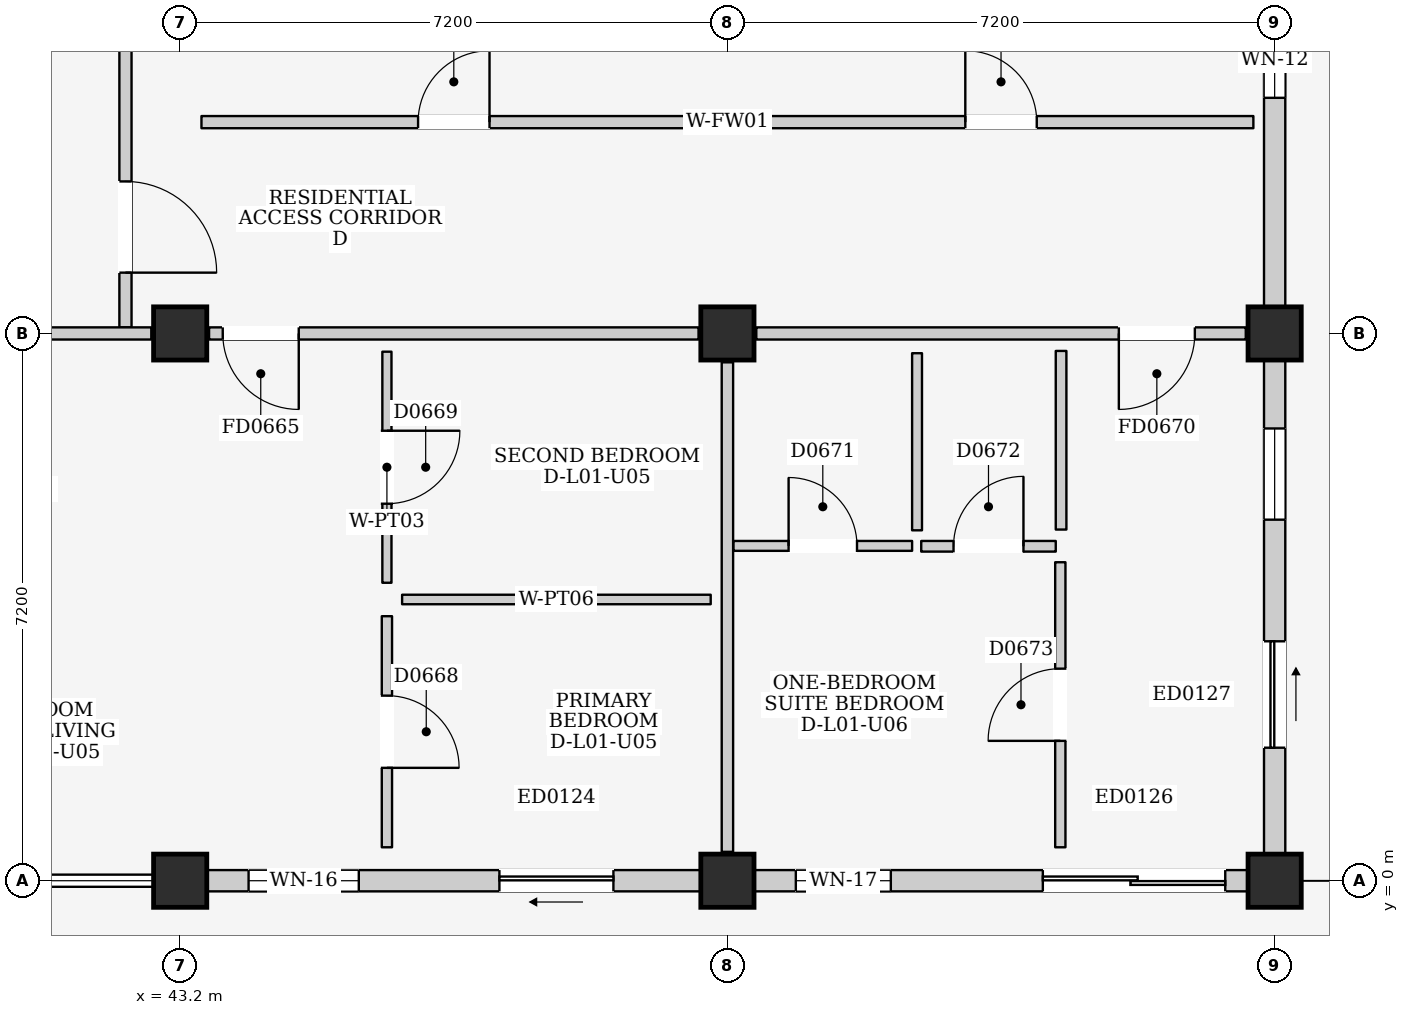
"""IFC4 building model, lengths in metres.
Left out: names, types, materials, properties, quantities, classifications, styles, units other than length and angle.
Written with IfcOpenShell. Run it as: python <this file> out.ifc"""

import sys

from ifc_helpers import new_model, si_unit, direction, frame, frame_2d, origin, origin_2d, place, context, subcontext, project, spatial, rectangle, extrude, element, fill, save


model = new_model("IFC4")
c1 = context("Model", 3, precision=1e-05, world=origin(), true_north=direction((0.0, 1.0)))
c2 = subcontext(c1, "Body", "Model", "MODEL_VIEW")
j1 = project(units=[si_unit("LENGTHUNIT", "METRE"), si_unit("PLANEANGLEUNIT", "RADIAN")], contexts=[c1])
p1 = place(None, origin())
s1 = spatial("IfcSite", under=j1, at=p1, CompositionType="ELEMENT")
p2 = place(p1, origin())
s2 = spatial("IfcBuilding", under=s1, at=p2, CompositionType="ELEMENT")
p3 = place(p2, frame((0.0, 0.0, 4.5)))
s3 = spatial("IfcBuildingStorey", under=s2, at=p3, CompositionType="ELEMENT", Elevation=4.5)
for number, where, z_axis, x_axis in (
    (1, (43.2, 0.0, 0.0), (0.0, 0.0, 1.0), (1.0, 0.0, 0.0)),
    (2, (43.2, 7.2, 0.0), (0.0, 0.0, 1.0), (1.0, 0.0, 0.0)),
    (3, (50.4, 0.0, 0.0), (0.0, 0.0, 1.0), (1.0, 0.0, 0.0)),
    (4, (50.4, 7.2, 0.0), (0.0, 0.0, 1.0), (1.0, 0.0, 0.0)),
    (5, (57.6, 0.0, 0.0), (0.0, 0.0, 1.0), (1.0, 0.0, 0.0)),
    (6, (57.6, 7.2, 0.0), (0.0, 0.0, 1.0), (1.0, 0.0, 0.0)),
):
    element("IfcColumn", number, at=place(p3, frame(where, z_axis=z_axis, x_axis=x_axis)), inside=s3, PredefinedType="COLUMN", context=c2, shape_type="SweptSolid", body=[
        extrude(rectangle(XDim=0.7, YDim=0.7, at=origin_2d()), origin(), (0.0, 0.0, 1.0), 4.5),
    ])
p4 = place(p3, frame((43.55, 0.0, 0.0), z_axis=(0.0, 0.0, 1.0), x_axis=(1.0, 0.0, 0.0)))
e7 = element("IfcWall", 7, at=p4, inside=s3, PredefinedType="ELEMENTEDWALL", context=c2, shape_type="SweptSolid", body=[
    extrude(rectangle(XDim=6.5, YDim=0.28, at=frame_2d((3.25, 0.0))), origin(), (0.0, 0.0, 1.0), 3.715),
])
p5 = place(p4, frame((3.85, 0.0, 0.0)))
e8 = element("IfcOpeningElement", 8, at=p5, cuts=e7, PredefinedType="OPENING", context=c2, shape_type="SweptSolid", body=[
    extrude(rectangle(XDim=1.5, YDim=2.12, at=frame_2d((0.75, 1.06))), frame((0.0, 0.155, 0.0), z_axis=(0.0, -1.0, 0.0), x_axis=(1.0, 0.0, 0.0)), (0.0, 0.0, 1.0), 0.31),
])
p6 = place(p4, frame((0.55, 0.0, 0.9)))
e9 = element("IfcOpeningElement", 9, at=p6, cuts=e7, PredefinedType="OPENING", context=c2, shape_type="SweptSolid", body=[
    extrude(rectangle(XDim=1.45, YDim=1.4, at=frame_2d((0.725, 0.7))), frame((0.0, 0.155, 0.0), z_axis=(0.0, -1.0, 0.0), x_axis=(1.0, 0.0, 0.0)), (0.0, 0.0, 1.0), 0.31),
])
p7 = place(p3, frame((50.75, 0.0, 0.0), z_axis=(0.0, 0.0, 1.0), x_axis=(1.0, 0.0, 0.0)))
e10 = element("IfcWall", 10, at=p7, inside=s3, PredefinedType="ELEMENTEDWALL", context=c2, shape_type="SweptSolid", body=[
    extrude(rectangle(XDim=6.5, YDim=0.28, at=frame_2d((3.25, 0.0))), origin(), (0.0, 0.0, 1.0), 3.715),
])
p8 = place(p7, frame((3.8, 0.0, 0.0)))
e11 = element("IfcOpeningElement", 11, at=p8, cuts=e10, PredefinedType="OPENING", context=c2, shape_type="SweptSolid", body=[
    extrude(rectangle(XDim=2.4, YDim=2.12, at=frame_2d((1.2, 1.06))), frame((0.0, 0.155, 0.0), z_axis=(0.0, -1.0, 0.0), x_axis=(1.0, 0.0, 0.0)), (0.0, 0.0, 1.0), 0.31),
])
p9 = place(p7, frame((0.55, 0.0, 0.9)))
e12 = element("IfcOpeningElement", 12, at=p9, cuts=e10, PredefinedType="OPENING", context=c2, shape_type="SweptSolid", body=[
    extrude(rectangle(XDim=1.25, YDim=1.3, at=frame_2d((0.625, 0.65))), frame((0.0, 0.155, 0.0), z_axis=(0.0, -1.0, 0.0), x_axis=(1.0, 0.0, 0.0)), (0.0, 0.0, 1.0), 0.31),
])
p10 = place(p3, frame((57.6, 0.35, 0.0), z_axis=(0.0, 0.0, 1.0), x_axis=(0.0, 1.0, 0.0)))
e13 = element("IfcWall", 13, at=p10, inside=s3, PredefinedType="ELEMENTEDWALL", context=c2, shape_type="SweptSolid", body=[
    extrude(rectangle(XDim=6.5, YDim=0.28, at=frame_2d((3.25, 0.0))), origin(), (0.0, 0.0, 1.0), 3.685),
])
p11 = place(p10, frame((1.4, 0.0, 0.0)))
e14 = element("IfcOpeningElement", 14, at=p11, cuts=e13, PredefinedType="OPENING", context=c2, shape_type="SweptSolid", body=[
    extrude(rectangle(XDim=1.4, YDim=2.1, at=frame_2d((0.7, 1.05))), frame((0.0, 0.155, 0.0), z_axis=(0.0, -1.0, 0.0), x_axis=(1.0, 0.0, 0.0)), (0.0, 0.0, 1.0), 0.31),
])
p12 = place(p10, frame((4.4, 0.0, 0.95)))
e15 = element("IfcOpeningElement", 15, at=p12, cuts=e13, PredefinedType="OPENING", context=c2, shape_type="SweptSolid", body=[
    extrude(rectangle(XDim=1.2, YDim=1.35, at=frame_2d((0.6, 0.675))), frame((0.0, 0.155, 0.0), z_axis=(0.0, -1.0, 0.0), x_axis=(1.0, 0.0, 0.0)), (0.0, 0.0, 1.0), 0.31),
])
p13 = place(p3, frame((57.6, 7.55, 0.0), z_axis=(0.0, 0.0, 1.0), x_axis=(0.0, 1.0, 0.0)))
e16 = element("IfcWall", 16, at=p13, inside=s3, PredefinedType="ELEMENTEDWALL", context=c2, shape_type="SweptSolid", body=[
    extrude(rectangle(XDim=6.5, YDim=0.28, at=frame_2d((3.25, 0.0))), origin(), (0.0, 0.0, 1.0), 3.685),
])
p14 = place(p13, frame((2.75, 0.0, 1.1)))
e17 = element("IfcOpeningElement", 17, at=p14, cuts=e16, PredefinedType="OPENING", context=c2, shape_type="SweptSolid", body=[
    extrude(rectangle(XDim=1.0, YDim=0.9, at=frame_2d((0.5, 0.45))), frame((0.0, 0.155, 0.0), z_axis=(0.0, -1.0, 0.0), x_axis=(1.0, 0.0, 0.0)), (0.0, 0.0, 1.0), 0.31),
])
p15 = place(p3, frame((42.48, 7.28, 0.0), z_axis=(0.0, 0.0, 1.0), x_axis=(0.0, 1.0, 0.0)))
e18 = element("IfcWall", 18, at=p15, inside=s3, PredefinedType="PARTITIONING", context=c2, shape_type="SweptSolid", body=[
    extrude(rectangle(XDim=4.32, YDim=0.16, at=frame_2d((2.16, 0.0))), origin(), (0.0, 0.0, 1.0), 4.25),
])
p16 = place(p15, frame((0.72, 0.0, 0.0)))
e19 = element("IfcOpeningElement", 19, at=p16, cuts=e18, PredefinedType="OPENING", context=c2, shape_type="SweptSolid", body=[
    extrude(rectangle(XDim=1.2, YDim=2.2, at=frame_2d((0.6, 1.1))), frame((0.0, 0.095, 0.0), z_axis=(0.0, -1.0, 0.0), x_axis=(1.0, 0.0, 0.0)), (0.0, 0.0, 1.0), 0.19),
])
p17 = place(p3, frame((36.38, 7.2, 0.0), z_axis=(0.0, 0.0, 1.0), x_axis=(1.0, 0.0, 0.0)))
e20 = element("IfcWall", 20, at=p17, inside=s3, PredefinedType="PARTITIONING", context=c2, shape_type="SweptSolid", body=[
    extrude(rectangle(XDim=6.44, YDim=0.16, at=frame_2d((3.22, 0.0))), origin(), (0.0, 0.0, 1.0), 3.635),
])
p18 = place(p3, frame((43.58, 7.2, 0.0), z_axis=(0.0, 0.0, 1.0), x_axis=(1.0, 0.0, 0.0)))
e21 = element("IfcWall", 21, at=p18, inside=s3, PredefinedType="PARTITIONING", context=c2, shape_type="SweptSolid", body=[
    extrude(rectangle(XDim=6.44, YDim=0.16, at=frame_2d((3.22, 0.0))), origin(), (0.0, 0.0, 1.0), 3.635),
])
p19 = place(p18, frame((0.18, 0.0, 0.0)))
e22 = element("IfcOpeningElement", 22, at=p19, cuts=e21, PredefinedType="OPENING", context=c2, shape_type="SweptSolid", body=[
    extrude(rectangle(XDim=1.0, YDim=2.15, at=frame_2d((0.5, 1.075))), frame((0.0, 0.095, 0.0), z_axis=(0.0, -1.0, 0.0), x_axis=(1.0, 0.0, 0.0)), (0.0, 0.0, 1.0), 0.19),
])
p20 = place(p3, frame((50.4, 0.38, 0.0), z_axis=(0.0, 0.0, 1.0), x_axis=(0.0, 1.0, 0.0)))
e23 = element("IfcWall", 23, at=p20, inside=s3, PredefinedType="PARTITIONING", context=c2, shape_type="SweptSolid", body=[
    extrude(rectangle(XDim=6.44, YDim=0.15, at=frame_2d((3.22, 0.0))), origin(), (0.0, 0.0, 1.0), 3.685),
])
p21 = place(p3, frame((45.92, 0.44, 0.0), z_axis=(0.0, 0.0, 1.0), x_axis=(0.0, 1.0, 0.0)))
e24 = element("IfcWall", 24, at=p21, inside=s3, PredefinedType="PARTITIONING", context=c2, shape_type="SweptSolid", body=[
    extrude(rectangle(XDim=3.04, YDim=0.135, at=frame_2d((1.52, 0.0))), origin(), (0.0, 0.0, 1.0), 4.25),
])
p22 = place(p21, frame((1.045, 0.0, 0.0)))
e25 = element("IfcOpeningElement", 25, at=p22, cuts=e24, PredefinedType="OPENING", context=c2, shape_type="SweptSolid", body=[
    extrude(rectangle(XDim=0.95, YDim=2.15, at=frame_2d((0.475, 1.075))), frame((0.0, 0.083, 0.0), z_axis=(0.0, -1.0, 0.0), x_axis=(1.0, 0.0, 0.0)), (0.0, 0.0, 1.0), 0.165),
])
p23 = place(p3, frame((46.12, 3.7, 0.0), z_axis=(0.0, 0.0, 1.0), x_axis=(1.0, 0.0, 0.0)))
e26 = element("IfcWall", 26, at=p23, inside=s3, PredefinedType="PARTITIONING", context=c2, shape_type="SweptSolid", body=[
    extrude(rectangle(XDim=4.06, YDim=0.125, at=frame_2d((2.03, 0.0))), origin(), (0.0, 0.0, 1.0), 4.25),
])
p24 = place(p3, frame((45.92, 3.92, 0.0), z_axis=(0.0, 0.0, 1.0), x_axis=(0.0, 1.0, 0.0)))
e27 = element("IfcWall", 27, at=p24, inside=s3, PredefinedType="PARTITIONING", context=c2, shape_type="SweptSolid", body=[
    extrude(rectangle(XDim=3.04, YDim=0.12, at=frame_2d((1.52, 0.0))), origin(), (0.0, 0.0, 1.0), 4.25),
])
p25 = place(p24, frame((1.04, 0.0, 0.0)))
e28 = element("IfcOpeningElement", 28, at=p25, cuts=e27, PredefinedType="OPENING", context=c2, shape_type="SweptSolid", body=[
    extrude(rectangle(XDim=0.96, YDim=2.15, at=frame_2d((0.48, 1.075))), frame((0.0, 0.075, 0.0), z_axis=(0.0, -1.0, 0.0), x_axis=(1.0, 0.0, 0.0)), (0.0, 0.0, 1.0), 0.15),
])
p26 = place(p3, frame((50.78, 7.2, 0.0), z_axis=(0.0, 0.0, 1.0), x_axis=(1.0, 0.0, 0.0)))
e29 = element("IfcWall", 29, at=p26, inside=s3, PredefinedType="PARTITIONING", context=c2, shape_type="SweptSolid", body=[
    extrude(rectangle(XDim=6.44, YDim=0.16, at=frame_2d((3.22, 0.0))), origin(), (0.0, 0.0, 1.0), 3.635),
])
p27 = place(p26, frame((4.77, 0.0, 0.0)))
e30 = element("IfcOpeningElement", 30, at=p27, cuts=e29, PredefinedType="OPENING", context=c2, shape_type="SweptSolid", body=[
    extrude(rectangle(XDim=1.0, YDim=2.15, at=frame_2d((0.5, 1.075))), frame((0.0, 0.095, 0.0), z_axis=(0.0, -1.0, 0.0), x_axis=(1.0, 0.0, 0.0)), (0.0, 0.0, 1.0), 0.19),
])
p28 = place(p3, frame((50.48, 4.405, 0.0), z_axis=(0.0, 0.0, 1.0), x_axis=(1.0, 0.0, 0.0)))
e31 = element("IfcWall", 31, at=p28, inside=s3, PredefinedType="PARTITIONING", context=c2, shape_type="SweptSolid", body=[
    extrude(rectangle(XDim=2.35, YDim=0.13, at=frame_2d((1.175, 0.0))), origin(), (0.0, 0.0, 1.0), 4.25),
])
p29 = place(p28, frame((0.725, 0.0, 0.0)))
e32 = element("IfcOpeningElement", 32, at=p29, cuts=e31, PredefinedType="OPENING", context=c2, shape_type="SweptSolid", body=[
    extrude(rectangle(XDim=0.9, YDim=2.1, at=frame_2d((0.45, 1.05))), frame((0.0, 0.08, 0.0), z_axis=(0.0, -1.0, 0.0), x_axis=(1.0, 0.0, 0.0)), (0.0, 0.0, 1.0), 0.16),
])
p30 = place(p3, frame((52.895, 4.61, 0.0), z_axis=(0.0, 0.0, 1.0), x_axis=(0.0, 1.0, 0.0)))
e33 = element("IfcWall", 33, at=p30, inside=s3, PredefinedType="PARTITIONING", context=c2, shape_type="SweptSolid", body=[
    extrude(rectangle(XDim=2.33, YDim=0.13, at=frame_2d((1.165, 0.0))), origin(), (0.0, 0.0, 1.0), 4.25),
])
p31 = place(p3, frame((52.95, 4.4, 0.0), z_axis=(0.0, 0.0, 1.0), x_axis=(1.0, 0.0, 0.0)))
e34 = element("IfcWall", 34, at=p31, inside=s3, PredefinedType="PARTITIONING", context=c2, shape_type="SweptSolid", body=[
    extrude(rectangle(XDim=1.77, YDim=0.14, at=frame_2d((0.885, 0.0))), origin(), (0.0, 0.0, 1.0), 4.25),
])
p32 = place(p31, frame((0.425, 0.0, 0.0)))
e35 = element("IfcOpeningElement", 35, at=p32, cuts=e34, PredefinedType="OPENING", context=c2, shape_type="SweptSolid", body=[
    extrude(rectangle(XDim=0.92, YDim=2.1, at=frame_2d((0.46, 1.05))), frame((0.0, 0.085, 0.0), z_axis=(0.0, -1.0, 0.0), x_axis=(1.0, 0.0, 0.0)), (0.0, 0.0, 1.0), 0.17),
])
p33 = place(p3, frame((54.79, 4.62, 0.0), z_axis=(0.0, 0.0, 1.0), x_axis=(0.0, 1.0, 0.0)))
e36 = element("IfcWall", 36, at=p33, inside=s3, PredefinedType="PARTITIONING", context=c2, shape_type="SweptSolid", body=[
    extrude(rectangle(XDim=2.35, YDim=0.14, at=frame_2d((1.175, 0.0))), origin(), (0.0, 0.0, 1.0), 4.25),
])
p34 = place(p3, frame((54.78, 0.44, 0.0), z_axis=(0.0, 0.0, 1.0), x_axis=(0.0, 1.0, 0.0)))
e37 = element("IfcWall", 37, at=p34, inside=s3, PredefinedType="PARTITIONING", context=c2, shape_type="SweptSolid", body=[
    extrude(rectangle(XDim=3.75, YDim=0.135, at=frame_2d((1.875, 0.0))), origin(), (0.0, 0.0, 1.0), 4.25),
])
p35 = place(p34, frame((1.4, 0.0, 0.0)))
e38 = element("IfcOpeningElement", 38, at=p35, cuts=e37, PredefinedType="OPENING", context=c2, shape_type="SweptSolid", body=[
    extrude(rectangle(XDim=0.95, YDim=2.15, at=frame_2d((0.475, 1.075))), frame((0.0, 0.083, 0.0), z_axis=(0.0, -1.0, 0.0), x_axis=(1.0, 0.0, 0.0)), (0.0, 0.0, 1.0), 0.165),
])
p36 = place(p3, frame((43.48, 9.98, 0.0), z_axis=(0.0, 0.0, 1.0), x_axis=(1.0, 0.0, 0.0)))
e39 = element("IfcWall", 39, at=p36, inside=s3, PredefinedType="PARTITIONING", context=c2, shape_type="SweptSolid", body=[
    extrude(rectangle(XDim=6.64, YDim=0.16, at=frame_2d((3.32, 0.0))), origin(), (0.0, 0.0, 1.0), 4.25),
])
p37 = place(p36, frame((2.85, 0.0, 0.0)))
e40 = element("IfcOpeningElement", 40, at=p37, cuts=e39, PredefinedType="OPENING", context=c2, shape_type="SweptSolid", body=[
    extrude(rectangle(XDim=0.94, YDim=2.12, at=frame_2d((0.47, 1.06))), frame((0.0, 0.095, 0.0), z_axis=(0.0, -1.0, 0.0), x_axis=(1.0, 0.0, 0.0)), (0.0, 0.0, 1.0), 0.19),
])
p38 = place(p3, frame((50.68, 9.98, 0.0), z_axis=(0.0, 0.0, 1.0), x_axis=(1.0, 0.0, 0.0)))
e41 = element("IfcWall", 41, at=p38, inside=s3, PredefinedType="PARTITIONING", context=c2, shape_type="SweptSolid", body=[
    extrude(rectangle(XDim=6.64, YDim=0.16, at=frame_2d((3.32, 0.0))), origin(), (0.0, 0.0, 1.0), 4.25),
])
p39 = place(p38, frame((2.85, 0.0, 0.0)))
e42 = element("IfcOpeningElement", 42, at=p39, cuts=e41, PredefinedType="OPENING", context=c2, shape_type="SweptSolid", body=[
    extrude(rectangle(XDim=0.94, YDim=2.12, at=frame_2d((0.47, 1.06))), frame((0.0, 0.095, 0.0), z_axis=(0.0, -1.0, 0.0), x_axis=(1.0, 0.0, 0.0)), (0.0, 0.0, 1.0), 0.19),
])
p40 = place(p5, frame((1.5, 0.0, 0.0), z_axis=(0.0, 0.0, 1.0), x_axis=(-1.0, 0.0, 0.0)))
e43 = element("IfcDoor", 43, at=p40, inside=s3, OperationType="SLIDING_TO_LEFT", PredefinedType="DOOR", context=c2, shape_type="SweptSolid", body=[
    extrude(rectangle(XDim=1.5, YDim=2.12, at=frame_2d((0.75, 1.06))), frame((0.0, 0.025, 0.0), z_axis=(0.0, -1.0, 0.0), x_axis=(1.0, 0.0, 0.0)), (0.0, 0.0, 1.0), 0.05),
])
fill(e8, e43)
p41 = place(p6, origin())
e44 = element("IfcWindow", 44, at=p41, inside=s3, PartitioningType="DOUBLE_PANEL_VERTICAL", PredefinedType="WINDOW", context=c2, shape_type="SweptSolid", body=[
    extrude(rectangle(XDim=1.45, YDim=1.4, at=frame_2d((0.725, 0.7))), frame((0.0, 0.03, 0.0), z_axis=(0.0, -1.0, 0.0), x_axis=(1.0, 0.0, 0.0)), (0.0, 0.0, 1.0), 0.06),
])
fill(e9, e44)
p42 = place(p8, frame((2.4, 0.0, 0.0), z_axis=(0.0, 0.0, 1.0), x_axis=(-1.0, 0.0, 0.0)))
e45 = element("IfcDoor", 45, at=p42, inside=s3, OperationType="DOUBLE_DOOR_SLIDING", PredefinedType="DOOR", context=c2, shape_type="SweptSolid", body=[
    extrude(rectangle(XDim=2.4, YDim=2.12, at=frame_2d((1.2, 1.06))), frame((0.0, 0.025, 0.0), z_axis=(0.0, -1.0, 0.0), x_axis=(1.0, 0.0, 0.0)), (0.0, 0.0, 1.0), 0.05),
])
fill(e11, e45)
p43 = place(p9, origin())
e46 = element("IfcWindow", 46, at=p43, inside=s3, PartitioningType="SINGLE_PANEL", PredefinedType="WINDOW", context=c2, shape_type="SweptSolid", body=[
    extrude(rectangle(XDim=1.25, YDim=1.3, at=frame_2d((0.625, 0.65))), frame((0.0, 0.03, 0.0), z_axis=(0.0, -1.0, 0.0), x_axis=(1.0, 0.0, 0.0)), (0.0, 0.0, 1.0), 0.06),
])
fill(e12, e46)
p44 = place(p11, frame((1.4, 0.0, 0.0), z_axis=(0.0, 0.0, 1.0), x_axis=(-1.0, 0.0, 0.0)))
e47 = element("IfcDoor", 47, at=p44, inside=s3, OperationType="SLIDING_TO_RIGHT", PredefinedType="DOOR", context=c2, shape_type="SweptSolid", body=[
    extrude(rectangle(XDim=1.4, YDim=2.1, at=frame_2d((0.7, 1.05))), frame((0.0, 0.025, 0.0), z_axis=(0.0, -1.0, 0.0), x_axis=(1.0, 0.0, 0.0)), (0.0, 0.0, 1.0), 0.05),
])
fill(e14, e47)
p45 = place(p12, origin())
e48 = element("IfcWindow", 48, at=p45, inside=s3, PartitioningType="SINGLE_PANEL", PredefinedType="WINDOW", context=c2, shape_type="SweptSolid", body=[
    extrude(rectangle(XDim=1.2, YDim=1.35, at=frame_2d((0.6, 0.675))), frame((0.0, 0.03, 0.0), z_axis=(0.0, -1.0, 0.0), x_axis=(1.0, 0.0, 0.0)), (0.0, 0.0, 1.0), 0.06),
])
fill(e15, e48)
p46 = place(p14, origin())
e49 = element("IfcWindow", 49, at=p46, inside=s3, PartitioningType="SINGLE_PANEL", PredefinedType="WINDOW", context=c2, shape_type="SweptSolid", body=[
    extrude(rectangle(XDim=1.0, YDim=0.9, at=frame_2d((0.5, 0.45))), frame((0.0, 0.03, 0.0), z_axis=(0.0, -1.0, 0.0), x_axis=(1.0, 0.0, 0.0)), (0.0, 0.0, 1.0), 0.06),
])
fill(e17, e49)
p47 = place(p16, frame((1.2, 0.0, 0.0), z_axis=(0.0, 0.0, 1.0), x_axis=(-1.0, 0.0, 0.0)))
e50 = element("IfcDoor", 50, at=p47, inside=s3, OperationType="SINGLE_SWING_RIGHT", PredefinedType="DOOR", context=c2, shape_type="SweptSolid", body=[
    extrude(rectangle(XDim=1.2, YDim=2.2, at=frame_2d((0.6, 1.1))), frame((0.0, 0.025, 0.0), z_axis=(0.0, -1.0, 0.0), x_axis=(1.0, 0.0, 0.0)), (0.0, 0.0, 1.0), 0.05),
])
fill(e19, e50)
p48 = place(p19, frame((1.0, 0.0, 0.0), z_axis=(0.0, 0.0, 1.0), x_axis=(-1.0, 0.0, 0.0)))
e51 = element("IfcDoor", 51, at=p48, inside=s3, OperationType="SINGLE_SWING_LEFT", PredefinedType="DOOR", context=c2, shape_type="SweptSolid", body=[
    extrude(rectangle(XDim=1.0, YDim=2.15, at=frame_2d((0.5, 1.075))), frame((0.0, 0.025, 0.0), z_axis=(0.0, -1.0, 0.0), x_axis=(1.0, 0.0, 0.0)), (0.0, 0.0, 1.0), 0.05),
])
fill(e22, e51)
p49 = place(p22, frame((0.95, 0.0, 0.0), z_axis=(0.0, 0.0, 1.0), x_axis=(-1.0, 0.0, 0.0)))
e52 = element("IfcDoor", 52, at=p49, inside=s3, OperationType="SINGLE_SWING_RIGHT", PredefinedType="DOOR", context=c2, shape_type="SweptSolid", body=[
    extrude(rectangle(XDim=0.95, YDim=2.15, at=frame_2d((0.475, 1.075))), frame((0.0, 0.025, 0.0), z_axis=(0.0, -1.0, 0.0), x_axis=(1.0, 0.0, 0.0)), (0.0, 0.0, 1.0), 0.05),
])
fill(e25, e52)
p50 = place(p25, frame((0.96, 0.0, 0.0), z_axis=(0.0, 0.0, 1.0), x_axis=(-1.0, 0.0, 0.0)))
e53 = element("IfcDoor", 53, at=p50, inside=s3, OperationType="SINGLE_SWING_LEFT", PredefinedType="DOOR", context=c2, shape_type="SweptSolid", body=[
    extrude(rectangle(XDim=0.96, YDim=2.15, at=frame_2d((0.48, 1.075))), frame((0.0, 0.025, 0.0), z_axis=(0.0, -1.0, 0.0), x_axis=(1.0, 0.0, 0.0)), (0.0, 0.0, 1.0), 0.05),
])
fill(e28, e53)
p51 = place(p27, frame((1.0, 0.0, 0.0), z_axis=(0.0, 0.0, 1.0), x_axis=(-1.0, 0.0, 0.0)))
e54 = element("IfcDoor", 54, at=p51, inside=s3, OperationType="SINGLE_SWING_RIGHT", PredefinedType="DOOR", context=c2, shape_type="SweptSolid", body=[
    extrude(rectangle(XDim=1.0, YDim=2.15, at=frame_2d((0.5, 1.075))), frame((0.0, 0.025, 0.0), z_axis=(0.0, -1.0, 0.0), x_axis=(1.0, 0.0, 0.0)), (0.0, 0.0, 1.0), 0.05),
])
fill(e30, e54)
p52 = place(p29, origin())
e55 = element("IfcDoor", 55, at=p52, inside=s3, OperationType="SINGLE_SWING_LEFT", PredefinedType="DOOR", context=c2, shape_type="SweptSolid", body=[
    extrude(rectangle(XDim=0.9, YDim=2.1, at=frame_2d((0.45, 1.05))), frame((0.0, 0.025, 0.0), z_axis=(0.0, -1.0, 0.0), x_axis=(1.0, 0.0, 0.0)), (0.0, 0.0, 1.0), 0.05),
])
fill(e32, e55)
p53 = place(p32, origin())
e56 = element("IfcDoor", 56, at=p53, inside=s3, OperationType="SINGLE_SWING_RIGHT", PredefinedType="DOOR", context=c2, shape_type="SweptSolid", body=[
    extrude(rectangle(XDim=0.92, YDim=2.1, at=frame_2d((0.46, 1.05))), frame((0.0, 0.025, 0.0), z_axis=(0.0, -1.0, 0.0), x_axis=(1.0, 0.0, 0.0)), (0.0, 0.0, 1.0), 0.05),
])
fill(e35, e56)
p54 = place(p35, origin())
e57 = element("IfcDoor", 57, at=p54, inside=s3, OperationType="SINGLE_SWING_LEFT", PredefinedType="DOOR", context=c2, shape_type="SweptSolid", body=[
    extrude(rectangle(XDim=0.95, YDim=2.15, at=frame_2d((0.475, 1.075))), frame((0.0, 0.025, 0.0), z_axis=(0.0, -1.0, 0.0), x_axis=(1.0, 0.0, 0.0)), (0.0, 0.0, 1.0), 0.05),
])
fill(e38, e57)
p55 = place(p37, origin())
e58 = element("IfcDoor", 58, at=p55, inside=s3, OperationType="SINGLE_SWING_RIGHT", PredefinedType="DOOR", context=c2, shape_type="SweptSolid", body=[
    extrude(rectangle(XDim=0.94, YDim=2.12, at=frame_2d((0.47, 1.06))), frame((0.0, 0.025, 0.0), z_axis=(0.0, -1.0, 0.0), x_axis=(1.0, 0.0, 0.0)), (0.0, 0.0, 1.0), 0.05),
])
fill(e40, e58)
p56 = place(p39, origin())
e59 = element("IfcDoor", 59, at=p56, inside=s3, OperationType="SINGLE_SWING_LEFT", PredefinedType="DOOR", context=c2, shape_type="SweptSolid", body=[
    extrude(rectangle(XDim=0.94, YDim=2.12, at=frame_2d((0.47, 1.06))), frame((0.0, 0.025, 0.0), z_axis=(0.0, -1.0, 0.0), x_axis=(1.0, 0.0, 0.0)), (0.0, 0.0, 1.0), 0.05),
])
fill(e42, e59)
save(model, sys.argv[1])
